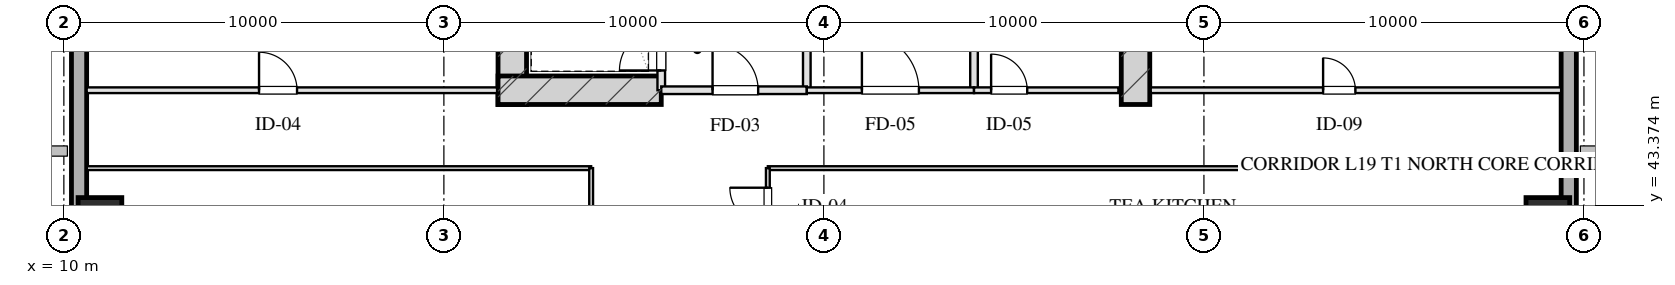
"""IFC4 building model, lengths in metres.
Left out: names, types, materials, properties, quantities, classifications, styles, units other than length and angle.
Written with IfcOpenShell. Run it as: python <this file> out.ifc"""

import sys

from ifc_helpers import new_model, si_unit, direction, frame, frame_2d, origin, origin_2d, place, context, subcontext, project, spatial, rectangle, hollow_rectangle, extrude, element, fill, save


model = new_model("IFC4")
c1 = context("Model", 3, precision=1e-05, world=origin(), true_north=direction((0.0, 1.0)))
c2 = subcontext(c1, "Body", "Model", "MODEL_VIEW")
j1 = project(units=[si_unit("LENGTHUNIT", "METRE"), si_unit("PLANEANGLEUNIT", "RADIAN")], contexts=[c1])
p1 = place(None, origin())
s1 = spatial("IfcSite", under=j1, at=p1, CompositionType="ELEMENT")
p2 = place(p1, origin())
s2 = spatial("IfcBuilding", under=s1, at=p2, CompositionType="ELEMENT")
p3 = place(p2, frame((0.0, 0.0, 78.2)))
s3 = spatial("IfcBuildingStorey", under=s2, at=p3, CompositionType="ELEMENT", Elevation=78.2)
for number, where, z_axis, x_axis in (
    (1, (21.8, 46.025, 0.0), (0.0, 0.0, 1.0), (0.0, 1.0, 0.0)),
    (2, (38.2, 46.025, 0.0), (0.0, 0.0, 1.0), (0.0, 1.0, 0.0)),
):
    element("IfcWall", number, at=place(p3, frame(where, z_axis=z_axis, x_axis=x_axis)), inside=s3, PredefinedType="SHEAR", context=c2, shape_type="SweptSolid", body=[
        extrude(rectangle(XDim=9.63, YDim=0.75, at=frame_2d((4.815, 0.0))), origin(), (0.0, 0.0, 1.0), 3.45),
    ])
p4 = place(p3, frame((21.425, 46.4, 0.0), z_axis=(0.0, 0.0, 1.0), x_axis=(1.0, 0.0, 0.0)))
e3 = element("IfcWall", 3, at=p4, inside=s3, PredefinedType="SHEAR", context=c2, shape_type="SweptSolid", body=[
    extrude(rectangle(XDim=4.295, YDim=0.75, at=frame_2d((2.147, 0.0))), origin(), (0.0, 0.0, 1.0), 3.45),
])
for number, where, z_axis, x_axis in (
    (4, (10.95, 43.0, 0.0), (0.0, 0.0, 1.0), (1.0, 0.0, 0.0)),
    (5, (49.05, 43.0, 0.0), (0.0, 0.0, 1.0), (1.0, 0.0, 0.0)),
):
    element("IfcColumn", number, at=place(p3, frame(where, z_axis=z_axis, x_axis=x_axis)), inside=s3, PredefinedType="COLUMN", context=c2, shape_type="SweptSolid", body=[
        extrude(hollow_rectangle(XDim=1.15, YDim=1.15, WallThickness=0.04, at=origin_2d()), origin(), (0.0, 0.0, 1.0), 3.451),
    ])
p5 = place(p3, frame((10.4, 7.2, 0.0), z_axis=(0.0, 0.0, 1.0), x_axis=(0.0, 1.0, 0.0)))
e6 = element("IfcWall", 6, at=p5, inside=s3, PredefinedType="SOLIDWALL", context=c2, shape_type="SweptSolid", body=[
    extrude(rectangle(XDim=53.6, YDim=0.4, at=frame_2d((26.8, 0.0))), origin(), (0.0, 0.0, 1.0), 2.61),
])
p6 = place(p5, frame((19.2, 0.0, 0.75)))
e7 = element("IfcOpeningElement", 7, at=p6, cuts=e6, PredefinedType="OPENING", context=c2, shape_type="SweptSolid", body=[
    extrude(rectangle(XDim=2.4, YDim=1.46, at=frame_2d((1.2, 0.73))), frame((0.0, 0.21, 0.0), z_axis=(0.0, -1.0, 0.0), x_axis=(1.0, 0.0, 0.0)), (0.0, 0.0, 1.0), 0.42),
])
p7 = place(p5, frame((30.65, 0.0, 0.0)))
e8 = element("IfcOpeningElement", 8, at=p7, cuts=e6, PredefinedType="OPENING", context=c2, shape_type="SweptSolid", body=[
    extrude(rectangle(XDim=1.1, YDim=2.15, at=frame_2d((0.55, 1.075))), frame((0.0, 0.21, 0.0), z_axis=(0.0, -1.0, 0.0), x_axis=(1.0, 0.0, 0.0)), (0.0, 0.0, 1.0), 0.42),
])
p8 = place(p3, frame((49.6, 60.8, 0.0), z_axis=(0.0, 0.0, 1.0), x_axis=(0.0, -1.0, 0.0)))
e9 = element("IfcWall", 9, at=p8, inside=s3, PredefinedType="SOLIDWALL", context=c2, shape_type="SweptSolid", body=[
    extrude(rectangle(XDim=53.6, YDim=0.4, at=frame_2d((26.8, 0.0))), origin(), (0.0, 0.0, 1.0), 2.61),
])
p9 = place(p8, frame((20.45, 0.0, 0.0)))
e10 = element("IfcOpeningElement", 10, at=p9, cuts=e9, PredefinedType="OPENING", context=c2, shape_type="SweptSolid", body=[
    extrude(rectangle(XDim=1.1, YDim=2.15, at=frame_2d((0.55, 1.075))), frame((0.0, 0.21, 0.0), z_axis=(0.0, -1.0, 0.0), x_axis=(1.0, 0.0, 0.0)), (0.0, 0.0, 1.0), 0.42),
])
p10 = place(p3, frame((25.72, 46.4, 0.0), z_axis=(0.0, 0.0, 1.0), x_axis=(0.0, 1.0, 0.0)))
e11 = element("IfcWall", 11, at=p10, inside=s3, PredefinedType="PARTITIONING", context=c2, shape_type="SweptSolid", body=[
    extrude(rectangle(XDim=1.9, YDim=0.2, at=frame_2d((0.95, 0.0))), origin(), (0.0, 0.0, 1.0), 3.175),
])
p11 = place(p10, frame((0.52, 0.0, 0.0)))
e12 = element("IfcOpeningElement", 12, at=p11, cuts=e11, PredefinedType="OPENING", context=c2, shape_type="SweptSolid", body=[
    extrude(rectangle(XDim=1.1, YDim=2.05, at=frame_2d((0.55, 1.025))), frame((0.0, 0.11, 0.0), z_axis=(0.0, -1.0, 0.0), x_axis=(1.0, 0.0, 0.0)), (0.0, 0.0, 1.0), 0.22),
])
p12 = place(p3, frame((29.55, 46.4, 0.0), z_axis=(0.0, 0.0, 1.0), x_axis=(0.0, 1.0, 0.0)))
e13 = element("IfcWall", 13, at=p12, inside=s3, PredefinedType="PARTITIONING", context=c2, shape_type="SweptSolid", body=[
    extrude(rectangle(XDim=8.43, YDim=0.2, at=frame_2d((4.215, 0.0))), origin(), (0.0, 0.0, 1.0), 3.175),
])
p13 = place(p3, frame((25.72, 46.4, 0.0), z_axis=(0.0, 0.0, 1.0), x_axis=(1.0, 0.0, 0.0)))
e14 = element("IfcWall", 14, at=p13, inside=s3, PredefinedType="PARTITIONING", context=c2, shape_type="SweptSolid", body=[
    extrude(rectangle(XDim=3.83, YDim=0.2, at=frame_2d((1.915, 0.0))), origin(), (0.0, 0.0, 1.0), 3.175),
])
p14 = place(p13, frame((1.35, 0.0, 0.0)))
e15 = element("IfcOpeningElement", 15, at=p14, cuts=e14, PredefinedType="OPENING", context=c2, shape_type="SweptSolid", body=[
    extrude(rectangle(XDim=1.2, YDim=2.05, at=frame_2d((0.6, 1.025))), frame((0.0, 0.11, 0.0), z_axis=(0.0, -1.0, 0.0), x_axis=(1.0, 0.0, 0.0)), (0.0, 0.0, 1.0), 0.22),
])
p15 = place(p3, frame((33.95, 46.4, 0.0), z_axis=(0.0, 0.0, 1.0), x_axis=(0.0, 1.0, 0.0)))
e16 = element("IfcWall", 16, at=p15, inside=s3, PredefinedType="PARTITIONING", context=c2, shape_type="SweptSolid", body=[
    extrude(rectangle(XDim=8.43, YDim=0.2, at=frame_2d((4.215, 0.0))), origin(), (0.0, 0.0, 1.0), 3.175),
])
p16 = place(p3, frame((29.55, 46.4, 0.0), z_axis=(0.0, 0.0, 1.0), x_axis=(1.0, 0.0, 0.0)))
e17 = element("IfcWall", 17, at=p16, inside=s3, PredefinedType="PARTITIONING", context=c2, shape_type="SweptSolid", body=[
    extrude(rectangle(XDim=4.4, YDim=0.15, at=frame_2d((2.2, 0.0))), origin(), (0.0, 0.0, 1.0), 3.175),
])
p17 = place(p16, frame((1.45, 0.0, 0.0)))
e18 = element("IfcOpeningElement", 18, at=p17, cuts=e17, PredefinedType="OPENING", context=c2, shape_type="SweptSolid", body=[
    extrude(rectangle(XDim=1.5, YDim=2.05, at=frame_2d((0.75, 1.025))), frame((0.0, 0.085, 0.0), z_axis=(0.0, -1.0, 0.0), x_axis=(1.0, 0.0, 0.0)), (0.0, 0.0, 1.0), 0.17),
])
p18 = place(p3, frame((33.95, 46.4, 0.0), z_axis=(0.0, 0.0, 1.0), x_axis=(1.0, 0.0, 0.0)))
e19 = element("IfcWall", 19, at=p18, inside=s3, PredefinedType="PARTITIONING", context=c2, shape_type="SweptSolid", body=[
    extrude(rectangle(XDim=3.8, YDim=0.15, at=frame_2d((1.9, 0.0))), origin(), (0.0, 0.0, 1.0), 3.175),
])
p19 = place(p18, frame((0.45, 0.0, 0.0)))
e20 = element("IfcOpeningElement", 20, at=p19, cuts=e19, PredefinedType="OPENING", context=c2, shape_type="SweptSolid", body=[
    extrude(rectangle(XDim=0.95, YDim=2.05, at=frame_2d((0.475, 1.025))), frame((0.0, 0.085, 0.0), z_axis=(0.0, -1.0, 0.0), x_axis=(1.0, 0.0, 0.0)), (0.0, 0.0, 1.0), 0.17),
])
p20 = place(p3, frame((10.6, 46.4, 0.0), z_axis=(0.0, 0.0, 1.0), x_axis=(1.0, 0.0, 0.0)))
e21 = element("IfcWall", 21, at=p20, inside=s3, PredefinedType="PARTITIONING", context=c2, shape_type="SweptSolid", body=[
    extrude(rectangle(XDim=10.8, YDim=0.15, at=frame_2d((5.4, 0.0))), origin(), (0.0, 0.0, 1.0), 3.175),
])
p21 = place(p20, frame((4.536, 0.0, 0.0)))
e22 = element("IfcOpeningElement", 22, at=p21, cuts=e21, PredefinedType="OPENING", context=c2, shape_type="SweptSolid", body=[
    extrude(rectangle(XDim=1.0, YDim=2.05, at=frame_2d((0.5, 1.025))), frame((0.0, 0.085, 0.0), z_axis=(0.0, -1.0, 0.0), x_axis=(1.0, 0.0, 0.0)), (0.0, 0.0, 1.0), 0.17),
])
p22 = place(p3, frame((38.6, 46.4, 0.0), z_axis=(0.0, 0.0, 1.0), x_axis=(1.0, 0.0, 0.0)))
e23 = element("IfcWall", 23, at=p22, inside=s3, PredefinedType="PARTITIONING", context=c2, shape_type="SweptSolid", body=[
    extrude(rectangle(XDim=10.8, YDim=0.15, at=frame_2d((5.4, 0.0))), origin(), (0.0, 0.0, 1.0), 3.175),
])
p23 = place(p22, frame((4.536, 0.0, 0.0)))
e24 = element("IfcOpeningElement", 24, at=p23, cuts=e23, PredefinedType="OPENING", context=c2, shape_type="SweptSolid", body=[
    extrude(rectangle(XDim=0.85, YDim=2.05, at=frame_2d((0.425, 1.025))), frame((0.0, 0.085, 0.0), z_axis=(0.0, -1.0, 0.0), x_axis=(1.0, 0.0, 0.0)), (0.0, 0.0, 1.0), 0.17),
])
p24 = place(p3, frame((10.6, 44.35, 0.0), z_axis=(0.0, 0.0, 1.0), x_axis=(1.0, 0.0, 0.0)))
e25 = element("IfcWall", 25, at=p24, inside=s3, PredefinedType="MOVABLE", context=c2, shape_type="SweptSolid", body=[
    extrude(rectangle(XDim=13.275, YDim=0.1, at=frame_2d((6.637, 0.0))), origin(), (0.0, 0.0, 1.0), 3.175),
])
p25 = place(p3, frame((28.525, 44.35, 0.0), z_axis=(0.0, 0.0, 1.0), x_axis=(1.0, 0.0, 0.0)))
e26 = element("IfcWall", 26, at=p25, inside=s3, PredefinedType="MOVABLE", context=c2, shape_type="SweptSolid", body=[
    extrude(rectangle(XDim=20.875, YDim=0.1, at=frame_2d((10.438, 0.0))), origin(), (0.0, 0.0, 1.0), 3.175),
])
p26 = place(p3, frame((23.875, 23.65, 0.0), z_axis=(0.0, 0.0, 1.0), x_axis=(0.0, 1.0, 0.0)))
e27 = element("IfcWall", 27, at=p26, inside=s3, PredefinedType="MOVABLE", context=c2, shape_type="SweptSolid", body=[
    extrude(rectangle(XDim=20.7, YDim=0.1, at=frame_2d((10.35, 0.0))), origin(), (0.0, 0.0, 1.0), 3.175),
])
p27 = place(p26, frame((4.075, 0.0, 0.0)))
e28 = element("IfcOpeningElement", 28, at=p27, cuts=e27, PredefinedType="OPENING", context=c2, shape_type="SweptSolid", body=[
    extrude(rectangle(XDim=1.0, YDim=2.05, at=frame_2d((0.5, 1.025))), frame((0.0, 0.06, 0.0), z_axis=(0.0, -1.0, 0.0), x_axis=(1.0, 0.0, 0.0)), (0.0, 0.0, 1.0), 0.12),
])
p28 = place(p26, frame((14.425, 0.0, 0.0)))
e29 = element("IfcOpeningElement", 29, at=p28, cuts=e27, PredefinedType="OPENING", context=c2, shape_type="SweptSolid", body=[
    extrude(rectangle(XDim=1.0, YDim=2.05, at=frame_2d((0.5, 1.025))), frame((0.0, 0.06, 0.0), z_axis=(0.0, -1.0, 0.0), x_axis=(1.0, 0.0, 0.0)), (0.0, 0.0, 1.0), 0.12),
])
p29 = place(p3, frame((28.525, 23.65, 0.0), z_axis=(0.0, 0.0, 1.0), x_axis=(0.0, 1.0, 0.0)))
e30 = element("IfcWall", 30, at=p29, inside=s3, PredefinedType="MOVABLE", context=c2, shape_type="SweptSolid", body=[
    extrude(rectangle(XDim=20.7, YDim=0.1, at=frame_2d((10.35, 0.0))), origin(), (0.0, 0.0, 1.0), 3.175),
])
p30 = place(p29, frame((0.775, 0.0, 0.0)))
e31 = element("IfcOpeningElement", 31, at=p30, cuts=e30, PredefinedType="OPENING", context=c2, shape_type="SweptSolid", body=[
    extrude(rectangle(XDim=1.05, YDim=2.05, at=frame_2d((0.525, 1.025))), frame((0.0, 0.06, 0.0), z_axis=(0.0, -1.0, 0.0), x_axis=(1.0, 0.0, 0.0)), (0.0, 0.0, 1.0), 0.12),
])
p31 = place(p29, frame((3.95, 0.0, 0.0)))
e32 = element("IfcOpeningElement", 32, at=p31, cuts=e30, PredefinedType="OPENING", context=c2, shape_type="SweptSolid", body=[
    extrude(rectangle(XDim=1.0, YDim=2.05, at=frame_2d((0.5, 1.025))), frame((0.0, 0.06, 0.0), z_axis=(0.0, -1.0, 0.0), x_axis=(1.0, 0.0, 0.0)), (0.0, 0.0, 1.0), 0.12),
])
p32 = place(p29, frame((7.51, 0.0, 0.0)))
e33 = element("IfcOpeningElement", 33, at=p32, cuts=e30, PredefinedType="OPENING", context=c2, shape_type="SweptSolid", body=[
    extrude(rectangle(XDim=1.0, YDim=2.05, at=frame_2d((0.5, 1.025))), frame((0.0, 0.06, 0.0), z_axis=(0.0, -1.0, 0.0), x_axis=(1.0, 0.0, 0.0)), (0.0, 0.0, 1.0), 0.12),
])
p33 = place(p29, frame((11.51, 0.0, 0.0)))
e34 = element("IfcOpeningElement", 34, at=p33, cuts=e30, PredefinedType="OPENING", context=c2, shape_type="SweptSolid", body=[
    extrude(rectangle(XDim=1.0, YDim=2.05, at=frame_2d((0.5, 1.025))), frame((0.0, 0.06, 0.0), z_axis=(0.0, -1.0, 0.0), x_axis=(1.0, 0.0, 0.0)), (0.0, 0.0, 1.0), 0.12),
])
p34 = place(p29, frame((15.75, 0.0, 0.0)))
e35 = element("IfcOpeningElement", 35, at=p34, cuts=e30, PredefinedType="OPENING", context=c2, shape_type="SweptSolid", body=[
    extrude(rectangle(XDim=1.0, YDim=2.05, at=frame_2d((0.5, 1.025))), frame((0.0, 0.06, 0.0), z_axis=(0.0, -1.0, 0.0), x_axis=(1.0, 0.0, 0.0)), (0.0, 0.0, 1.0), 0.12),
])
p35 = place(p29, frame((19.185, 0.0, 0.0)))
e36 = element("IfcOpeningElement", 36, at=p35, cuts=e30, PredefinedType="OPENING", context=c2, shape_type="SweptSolid", body=[
    extrude(rectangle(XDim=1.0, YDim=2.05, at=frame_2d((0.5, 1.025))), frame((0.0, 0.06, 0.0), z_axis=(0.0, -1.0, 0.0), x_axis=(1.0, 0.0, 0.0)), (0.0, 0.0, 1.0), 0.12),
])
p36 = place(p11, origin())
e37 = element("IfcDoor", 37, at=p36, inside=s3, OperationType="SINGLE_SWING_LEFT", PredefinedType="DOOR", context=c2, shape_type="SweptSolid", body=[
    extrude(rectangle(XDim=1.1, YDim=2.05, at=frame_2d((0.55, 1.025))), frame((0.0, 0.025, 0.0), z_axis=(0.0, -1.0, 0.0), x_axis=(1.0, 0.0, 0.0)), (0.0, 0.0, 1.0), 0.05),
])
fill(e12, e37)
p37 = place(p14, origin())
e38 = element("IfcDoor", 38, at=p37, inside=s3, OperationType="SINGLE_SWING_LEFT", PredefinedType="DOOR", context=c2, shape_type="SweptSolid", body=[
    extrude(rectangle(XDim=1.2, YDim=2.05, at=frame_2d((0.6, 1.025))), frame((0.0, 0.025, 0.0), z_axis=(0.0, -1.0, 0.0), x_axis=(1.0, 0.0, 0.0)), (0.0, 0.0, 1.0), 0.05),
])
fill(e15, e38)
p38 = place(p17, origin())
e39 = element("IfcDoor", 39, at=p38, inside=s3, OperationType="SINGLE_SWING_LEFT", PredefinedType="DOOR", context=c2, shape_type="SweptSolid", body=[
    extrude(rectangle(XDim=1.5, YDim=2.05, at=frame_2d((0.75, 1.025))), frame((0.0, 0.025, 0.0), z_axis=(0.0, -1.0, 0.0), x_axis=(1.0, 0.0, 0.0)), (0.0, 0.0, 1.0), 0.05),
])
fill(e18, e39)
p39 = place(p19, origin())
e40 = element("IfcDoor", 40, at=p39, inside=s3, OperationType="SINGLE_SWING_LEFT", PredefinedType="DOOR", context=c2, shape_type="SweptSolid", body=[
    extrude(rectangle(XDim=0.95, YDim=2.05, at=frame_2d((0.475, 1.025))), frame((0.0, 0.025, 0.0), z_axis=(0.0, -1.0, 0.0), x_axis=(1.0, 0.0, 0.0)), (0.0, 0.0, 1.0), 0.05),
])
fill(e20, e40)
p40 = place(p21, origin())
e41 = element("IfcDoor", 41, at=p40, inside=s3, OperationType="SINGLE_SWING_LEFT", PredefinedType="DOOR", context=c2, shape_type="SweptSolid", body=[
    extrude(rectangle(XDim=1.0, YDim=2.05, at=frame_2d((0.5, 1.025))), frame((0.0, 0.025, 0.0), z_axis=(0.0, -1.0, 0.0), x_axis=(1.0, 0.0, 0.0)), (0.0, 0.0, 1.0), 0.05),
])
fill(e22, e41)
p41 = place(p23, origin())
e42 = element("IfcDoor", 42, at=p41, inside=s3, OperationType="SINGLE_SWING_LEFT", PredefinedType="DOOR", context=c2, shape_type="SweptSolid", body=[
    extrude(rectangle(XDim=0.85, YDim=2.05, at=frame_2d((0.425, 1.025))), frame((0.0, 0.025, 0.0), z_axis=(0.0, -1.0, 0.0), x_axis=(1.0, 0.0, 0.0)), (0.0, 0.0, 1.0), 0.05),
])
fill(e24, e42)
p42 = place(p35, origin())
e43 = element("IfcDoor", 43, at=p42, inside=s3, OperationType="SINGLE_SWING_RIGHT", PredefinedType="DOOR", context=c2, shape_type="SweptSolid", body=[
    extrude(rectangle(XDim=1.0, YDim=2.05, at=frame_2d((0.5, 1.025))), frame((0.0, 0.025, 0.0), z_axis=(0.0, -1.0, 0.0), x_axis=(1.0, 0.0, 0.0)), (0.0, 0.0, 1.0), 0.05),
])
fill(e36, e43)
save(model, sys.argv[1])
